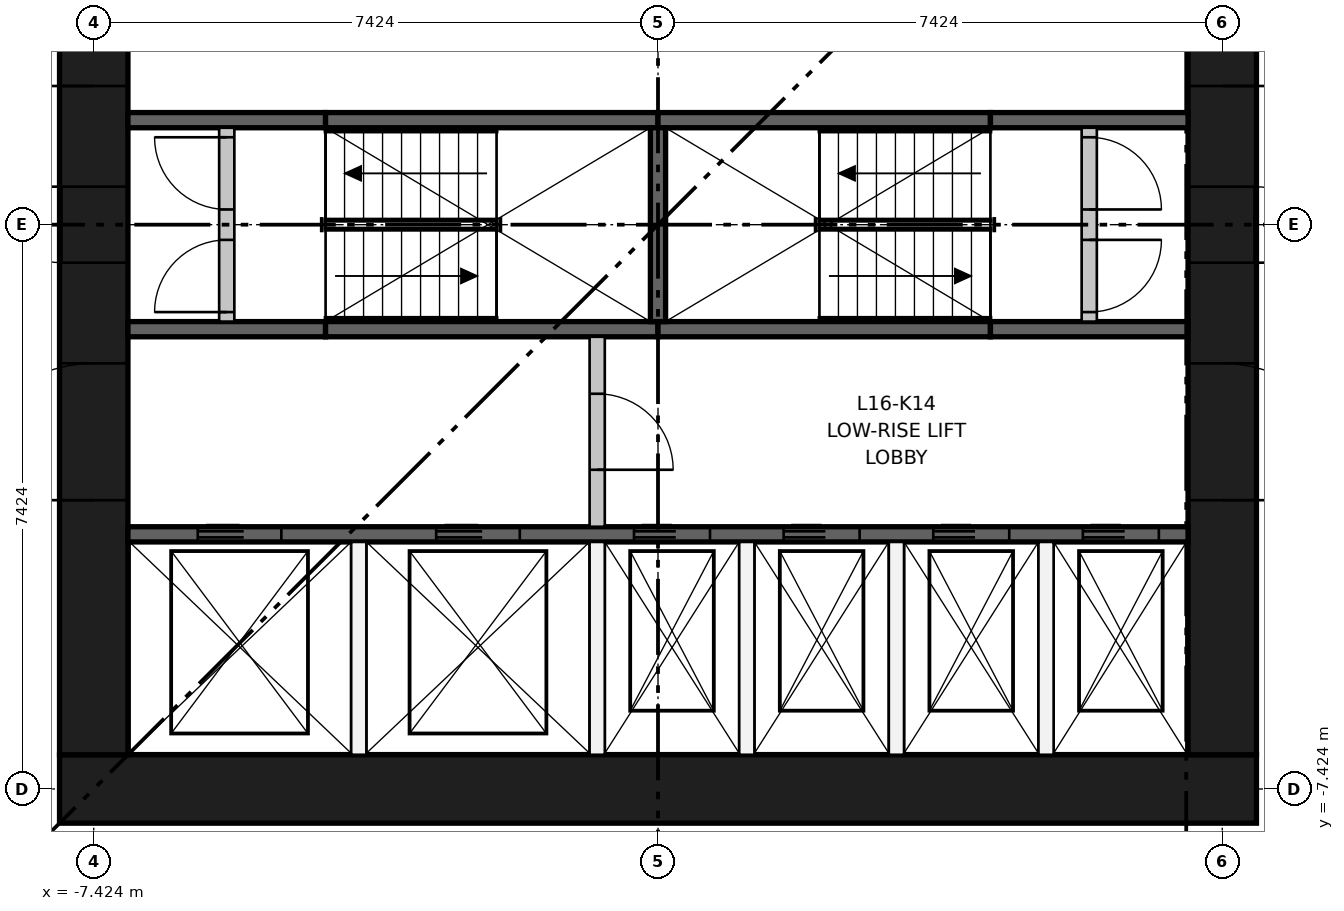
"""IFC4 building model, lengths in metres.
Left out: names, types, materials, properties, quantities, classifications, styles, units other than length and angle.
Written with IfcOpenShell. Run it as: python <this file> out.ifc"""

import sys

from ifc_helpers import new_model, si_unit, direction, frame, frame_2d, origin, place, context, subcontext, project, spatial, rectangle, extrude, element, fill, save


model = new_model("IFC4")
c1 = context("Model", 3, precision=1e-05, world=origin(), true_north=direction((0.0, 1.0)))
c2 = subcontext(c1, "Body", "Model", "MODEL_VIEW")
j1 = project(units=[si_unit("LENGTHUNIT", "METRE"), si_unit("PLANEANGLEUNIT", "RADIAN")], contexts=[c1])
p1 = place(None, origin())
s1 = spatial("IfcSite", under=j1, at=p1, CompositionType="ELEMENT")
p2 = place(p1, origin())
s2 = spatial("IfcBuilding", under=s1, at=p2, CompositionType="ELEMENT")
p3 = place(p2, frame((0.0, 0.0, 62.7)))
s3 = spatial("IfcBuildingStorey", under=s2, at=p3, CompositionType="ELEMENT", Elevation=62.7)
p4 = place(p3, frame((-7.874, -7.424, 0.0), z_axis=(0.0, 0.0, 1.0), x_axis=(1.0, 0.0, 0.0)))
e1 = element("IfcWall", 1, at=p4, inside=s3, PredefinedType="SHEAR", context=c2, shape_type="SweptSolid", body=[
    extrude(rectangle(XDim=15.748, YDim=0.9, at=frame_2d((7.874, 0.0))), origin(), (0.0, 0.0, 1.0), 3.65),
])
p5 = place(p3, frame((-7.424, -6.974, 0.0), z_axis=(0.0, 0.0, 1.0), x_axis=(0.0, 1.0, 0.0)))
e2 = element("IfcWall", 2, at=p5, inside=s3, PredefinedType="SHEAR", context=c2, shape_type="SweptSolid", body=[
    extrude(rectangle(XDim=13.948, YDim=0.9, at=frame_2d((6.974, 0.0))), origin(), (0.0, 0.0, 1.0), 3.65),
])
p6 = place(p5, frame((6.474, 0.0, 0.0)))
e3 = element("IfcOpeningElement", 3, at=p6, cuts=e2, PredefinedType="OPENING", context=c2, shape_type="SweptSolid", body=[
    extrude(rectangle(XDim=1.0, YDim=2.1, at=frame_2d((0.5, 1.05))), frame((0.0, 0.46, 0.0), z_axis=(0.0, -1.0, 0.0), x_axis=(1.0, 0.0, 0.0)), (0.0, 0.0, 1.0), 0.92),
])
p7 = place(p5, frame((3.35, 0.0, 0.0)))
e4 = element("IfcOpeningElement", 4, at=p7, cuts=e2, PredefinedType="OPENING", context=c2, shape_type="SweptSolid", body=[
    extrude(rectangle(XDim=1.8, YDim=2.1, at=frame_2d((0.9, 1.05))), frame((0.0, 0.46, 0.0), z_axis=(0.0, -1.0, 0.0), x_axis=(1.0, 0.0, 0.0)), (0.0, 0.0, 1.0), 0.92),
])
p8 = place(p5, frame((8.799, 0.0, 0.0)))
e5 = element("IfcOpeningElement", 5, at=p8, cuts=e2, PredefinedType="OPENING", context=c2, shape_type="SweptSolid", body=[
    extrude(rectangle(XDim=1.8, YDim=2.1, at=frame_2d((0.9, 1.05))), frame((0.0, 0.46, 0.0), z_axis=(0.0, -1.0, 0.0), x_axis=(1.0, 0.0, 0.0)), (0.0, 0.0, 1.0), 0.92),
])
p9 = place(p5, frame((11.974, 0.0, 0.0)))
e6 = element("IfcOpeningElement", 6, at=p9, cuts=e2, PredefinedType="OPENING", context=c2, shape_type="SweptSolid", body=[
    extrude(rectangle(XDim=1.0, YDim=2.1, at=frame_2d((0.5, 1.05))), frame((0.0, 0.46, 0.0), z_axis=(0.0, -1.0, 0.0), x_axis=(1.0, 0.0, 0.0)), (0.0, 0.0, 1.0), 0.92),
])
p10 = place(p3, frame((7.424, -6.974, 0.0), z_axis=(0.0, 0.0, 1.0), x_axis=(0.0, 1.0, 0.0)))
e7 = element("IfcWall", 7, at=p10, inside=s3, PredefinedType="SHEAR", context=c2, shape_type="SweptSolid", body=[
    extrude(rectangle(XDim=13.948, YDim=0.9, at=frame_2d((6.974, 0.0))), origin(), (0.0, 0.0, 1.0), 3.65),
])
p11 = place(p10, frame((6.474, 0.0, 0.0)))
e8 = element("IfcOpeningElement", 8, at=p11, cuts=e7, PredefinedType="OPENING", context=c2, shape_type="SweptSolid", body=[
    extrude(rectangle(XDim=1.0, YDim=2.1, at=frame_2d((0.5, 1.05))), frame((0.0, 0.46, 0.0), z_axis=(0.0, -1.0, 0.0), x_axis=(1.0, 0.0, 0.0)), (0.0, 0.0, 1.0), 0.92),
])
p12 = place(p10, frame((3.35, 0.0, 0.0)))
e9 = element("IfcOpeningElement", 9, at=p12, cuts=e7, PredefinedType="OPENING", context=c2, shape_type="SweptSolid", body=[
    extrude(rectangle(XDim=1.8, YDim=2.1, at=frame_2d((0.9, 1.05))), frame((0.0, 0.46, 0.0), z_axis=(0.0, -1.0, 0.0), x_axis=(1.0, 0.0, 0.0)), (0.0, 0.0, 1.0), 0.92),
])
p13 = place(p10, frame((8.799, 0.0, 0.0)))
e10 = element("IfcOpeningElement", 10, at=p13, cuts=e7, PredefinedType="OPENING", context=c2, shape_type="SweptSolid", body=[
    extrude(rectangle(XDim=1.8, YDim=2.1, at=frame_2d((0.9, 1.05))), frame((0.0, 0.46, 0.0), z_axis=(0.0, -1.0, 0.0), x_axis=(1.0, 0.0, 0.0)), (0.0, 0.0, 1.0), 0.92),
])
p14 = place(p3, frame((-6.974, -4.074, 0.0), z_axis=(0.0, 0.0, 1.0), x_axis=(1.0, 0.0, 0.0)))
e11 = element("IfcWall", 11, at=p14, inside=s3, PredefinedType="SHEAR", context=c2, shape_type="SweptSolid", body=[
    extrude(rectangle(XDim=13.948, YDim=0.2, at=frame_2d((6.974, 0.0))), origin(), (0.0, 0.0, 1.0), 3.3),
])
p15 = place(p14, frame((0.918, 0.0, 0.0)))
e12 = element("IfcOpeningElement", 12, at=p15, cuts=e11, PredefinedType="OPENING", context=c2, shape_type="SweptSolid", body=[
    extrude(rectangle(XDim=1.1, YDim=2.1, at=frame_2d((0.55, 1.05))), frame((0.0, 0.11, 0.0), z_axis=(0.0, -1.0, 0.0), x_axis=(1.0, 0.0, 0.0)), (0.0, 0.0, 1.0), 0.22),
])
p16 = place(p14, frame((4.055, 0.0, 0.0)))
e13 = element("IfcOpeningElement", 13, at=p16, cuts=e11, PredefinedType="OPENING", context=c2, shape_type="SweptSolid", body=[
    extrude(rectangle(XDim=1.1, YDim=2.1, at=frame_2d((0.55, 1.05))), frame((0.0, 0.11, 0.0), z_axis=(0.0, -1.0, 0.0), x_axis=(1.0, 0.0, 0.0)), (0.0, 0.0, 1.0), 0.22),
])
p17 = place(p14, frame((6.658, 0.0, 0.0)))
e14 = element("IfcOpeningElement", 14, at=p17, cuts=e11, PredefinedType="OPENING", context=c2, shape_type="SweptSolid", body=[
    extrude(rectangle(XDim=1.0, YDim=2.1, at=frame_2d((0.5, 1.05))), frame((0.0, 0.11, 0.0), z_axis=(0.0, -1.0, 0.0), x_axis=(1.0, 0.0, 0.0)), (0.0, 0.0, 1.0), 0.22),
])
p18 = place(p14, frame((8.627, 0.0, 0.0)))
e15 = element("IfcOpeningElement", 15, at=p18, cuts=e11, PredefinedType="OPENING", context=c2, shape_type="SweptSolid", body=[
    extrude(rectangle(XDim=1.0, YDim=2.1, at=frame_2d((0.5, 1.05))), frame((0.0, 0.11, 0.0), z_axis=(0.0, -1.0, 0.0), x_axis=(1.0, 0.0, 0.0)), (0.0, 0.0, 1.0), 0.22),
])
p19 = place(p14, frame((10.595, 0.0, 0.0)))
e16 = element("IfcOpeningElement", 16, at=p19, cuts=e11, PredefinedType="OPENING", context=c2, shape_type="SweptSolid", body=[
    extrude(rectangle(XDim=1.0, YDim=2.1, at=frame_2d((0.5, 1.05))), frame((0.0, 0.11, 0.0), z_axis=(0.0, -1.0, 0.0), x_axis=(1.0, 0.0, 0.0)), (0.0, 0.0, 1.0), 0.22),
])
p20 = place(p14, frame((12.564, 0.0, 0.0)))
e17 = element("IfcOpeningElement", 17, at=p20, cuts=e11, PredefinedType="OPENING", context=c2, shape_type="SweptSolid", body=[
    extrude(rectangle(XDim=1.0, YDim=2.1, at=frame_2d((0.5, 1.05))), frame((0.0, 0.11, 0.0), z_axis=(0.0, -1.0, 0.0), x_axis=(1.0, 0.0, 0.0)), (0.0, 0.0, 1.0), 0.22),
])
p21 = place(p3, frame((-6.974, -1.375, 0.0), z_axis=(0.0, 0.0, 1.0), x_axis=(1.0, 0.0, 0.0)))
e18 = element("IfcWall", 18, at=p21, inside=s3, PredefinedType="SHEAR", context=c2, shape_type="SweptSolid", body=[
    extrude(rectangle(XDim=2.6, YDim=0.2, at=frame_2d((1.3, 0.0))), origin(), (0.0, 0.0, 1.0), 3.3),
])
for number, where, z_axis, x_axis in (
    (19, (-4.374, -1.375, 0.0), (0.0, 0.0, 1.0), (1.0, 0.0, 0.0)),
    (20, (0.0, -1.375, 0.0), (0.0, 0.0, 1.0), (1.0, 0.0, 0.0)),
):
    element("IfcWall", number, at=place(p3, frame(where, z_axis=z_axis, x_axis=x_axis)), inside=s3, PredefinedType="SHEAR", context=c2, shape_type="SweptSolid", body=[
        extrude(rectangle(XDim=4.374, YDim=0.2, at=frame_2d((2.187, 0.0))), origin(), (0.0, 0.0, 1.0), 3.3),
    ])
for number, where, z_axis, x_axis in (
    (21, (4.374, -1.375, 0.0), (0.0, 0.0, 1.0), (1.0, 0.0, 0.0)),
    (22, (-6.974, 1.375, 0.0), (0.0, 0.0, 1.0), (1.0, 0.0, 0.0)),
):
    element("IfcWall", number, at=place(p3, frame(where, z_axis=z_axis, x_axis=x_axis)), inside=s3, PredefinedType="SHEAR", context=c2, shape_type="SweptSolid", body=[
        extrude(rectangle(XDim=2.6, YDim=0.2, at=frame_2d((1.3, 0.0))), origin(), (0.0, 0.0, 1.0), 3.3),
    ])
for number, where, z_axis, x_axis in (
    (23, (-4.374, 1.375, 0.0), (0.0, 0.0, 1.0), (1.0, 0.0, 0.0)),
    (24, (0.0, 1.375, 0.0), (0.0, 0.0, 1.0), (1.0, 0.0, 0.0)),
):
    element("IfcWall", number, at=place(p3, frame(where, z_axis=z_axis, x_axis=x_axis)), inside=s3, PredefinedType="SHEAR", context=c2, shape_type="SweptSolid", body=[
        extrude(rectangle(XDim=4.374, YDim=0.2, at=frame_2d((2.187, 0.0))), origin(), (0.0, 0.0, 1.0), 3.3),
    ])
p22 = place(p3, frame((4.374, 1.375, 0.0), z_axis=(0.0, 0.0, 1.0), x_axis=(1.0, 0.0, 0.0)))
e25 = element("IfcWall", 25, at=p22, inside=s3, PredefinedType="SHEAR", context=c2, shape_type="SweptSolid", body=[
    extrude(rectangle(XDim=2.6, YDim=0.2, at=frame_2d((1.3, 0.0))), origin(), (0.0, 0.0, 1.0), 3.3),
])
p23 = place(p3, frame((0.0, -1.275, 0.0), z_axis=(0.0, 0.0, 1.0), x_axis=(0.0, 1.0, 0.0)))
e26 = element("IfcWall", 26, at=p23, inside=s3, PredefinedType="SHEAR", context=c2, shape_type="SweptSolid", body=[
    extrude(rectangle(XDim=2.55, YDim=0.2, at=frame_2d((1.275, 0.0))), origin(), (0.0, 0.0, 1.0), 3.3),
])
for number, where, z_axis, x_axis in (
    (27, (-3.937, -6.974, 0.0), (0.0, 0.0, 1.0), (0.0, 1.0, 0.0)),
    (28, (-0.8, -6.974, 0.0), (0.0, 0.0, 1.0), (0.0, 1.0, 0.0)),
):
    element("IfcWall", number, at=place(p3, frame(where, z_axis=z_axis, x_axis=x_axis)), inside=s3, PredefinedType="PARTITIONING", context=c2, shape_type="SweptSolid", body=[
        extrude(rectangle(XDim=2.8, YDim=0.2, at=frame_2d((1.4, 0.0))), origin(), (0.0, 0.0, 1.0), 3.3),
    ])
p24 = place(p3, frame((-0.8, -3.974, 0.0), z_axis=(0.0, 0.0, 1.0), x_axis=(0.0, 1.0, 0.0)))
e29 = element("IfcWall", 29, at=p24, inside=s3, PredefinedType="PARTITIONING", context=c2, shape_type="SweptSolid", body=[
    extrude(rectangle(XDim=2.499, YDim=0.2, at=frame_2d((1.25, 0.0))), origin(), (0.0, 0.0, 1.0), 3.3),
])
p25 = place(p24, frame((0.75, 0.0, 0.0)))
e30 = element("IfcOpeningElement", 30, at=p25, cuts=e29, PredefinedType="OPENING", context=c2, shape_type="SweptSolid", body=[
    extrude(rectangle(XDim=1.0, YDim=2.1, at=frame_2d((0.5, 1.05))), frame((0.0, 0.11, 0.0), z_axis=(0.0, -1.0, 0.0), x_axis=(1.0, 0.0, 0.0)), (0.0, 0.0, 1.0), 0.22),
])
for number, where, z_axis, x_axis in (
    (31, (1.168, -6.974, 0.0), (0.0, 0.0, 1.0), (0.0, 1.0, 0.0)),
    (32, (3.137, -6.974, 0.0), (0.0, 0.0, 1.0), (0.0, 1.0, 0.0)),
    (33, (5.105, -6.974, 0.0), (0.0, 0.0, 1.0), (0.0, 1.0, 0.0)),
):
    element("IfcWall", number, at=place(p3, frame(where, z_axis=z_axis, x_axis=x_axis)), inside=s3, PredefinedType="PARTITIONING", context=c2, shape_type="SweptSolid", body=[
        extrude(rectangle(XDim=2.8, YDim=0.2, at=frame_2d((1.4, 0.0))), origin(), (0.0, 0.0, 1.0), 3.3),
    ])
p26 = place(p3, frame((-5.674, -1.275, 0.0), z_axis=(0.0, 0.0, 1.0), x_axis=(0.0, 1.0, 0.0)))
e34 = element("IfcWall", 34, at=p26, inside=s3, PredefinedType="PARTITIONING", context=c2, shape_type="SweptSolid", body=[
    extrude(rectangle(XDim=2.55, YDim=0.2, at=frame_2d((1.275, 0.0))), origin(), (0.0, 0.0, 1.0), 3.3),
])
p27 = place(p26, frame((0.125, 0.0, 0.0)))
e35 = element("IfcOpeningElement", 35, at=p27, cuts=e34, PredefinedType="OPENING", context=c2, shape_type="SweptSolid", body=[
    extrude(rectangle(XDim=0.95, YDim=2.1, at=frame_2d((0.475, 1.05))), frame((0.0, 0.11, 0.0), z_axis=(0.0, -1.0, 0.0), x_axis=(1.0, 0.0, 0.0)), (0.0, 0.0, 1.0), 0.22),
])
p28 = place(p26, frame((1.475, 0.0, 0.0)))
e36 = element("IfcOpeningElement", 36, at=p28, cuts=e34, PredefinedType="OPENING", context=c2, shape_type="SweptSolid", body=[
    extrude(rectangle(XDim=0.95, YDim=2.1, at=frame_2d((0.475, 1.05))), frame((0.0, 0.11, 0.0), z_axis=(0.0, -1.0, 0.0), x_axis=(1.0, 0.0, 0.0)), (0.0, 0.0, 1.0), 0.22),
])
p29 = place(p3, frame((5.674, -1.275, 0.0), z_axis=(0.0, 0.0, 1.0), x_axis=(0.0, 1.0, 0.0)))
e37 = element("IfcWall", 37, at=p29, inside=s3, PredefinedType="PARTITIONING", context=c2, shape_type="SweptSolid", body=[
    extrude(rectangle(XDim=2.55, YDim=0.2, at=frame_2d((1.275, 0.0))), origin(), (0.0, 0.0, 1.0), 3.3),
])
p30 = place(p29, frame((0.125, 0.0, 0.0)))
e38 = element("IfcOpeningElement", 38, at=p30, cuts=e37, PredefinedType="OPENING", context=c2, shape_type="SweptSolid", body=[
    extrude(rectangle(XDim=0.95, YDim=2.1, at=frame_2d((0.475, 1.05))), frame((0.0, 0.11, 0.0), z_axis=(0.0, -1.0, 0.0), x_axis=(1.0, 0.0, 0.0)), (0.0, 0.0, 1.0), 0.22),
])
p31 = place(p29, frame((1.475, 0.0, 0.0)))
e39 = element("IfcOpeningElement", 39, at=p31, cuts=e37, PredefinedType="OPENING", context=c2, shape_type="SweptSolid", body=[
    extrude(rectangle(XDim=0.95, YDim=2.1, at=frame_2d((0.475, 1.05))), frame((0.0, 0.11, 0.0), z_axis=(0.0, -1.0, 0.0), x_axis=(1.0, 0.0, 0.0)), (0.0, 0.0, 1.0), 0.22),
])
p32 = place(p15, origin())
e40 = element("IfcDoor", 40, at=p32, inside=s3, OperationType="DOUBLE_DOOR_SLIDING", PredefinedType="DOOR", context=c2, shape_type="SweptSolid", body=[
    extrude(rectangle(XDim=1.1, YDim=2.1, at=frame_2d((0.55, 1.05))), frame((0.0, 0.025, 0.0), z_axis=(0.0, -1.0, 0.0), x_axis=(1.0, 0.0, 0.0)), (0.0, 0.0, 1.0), 0.05),
])
fill(e12, e40)
p33 = place(p16, origin())
e41 = element("IfcDoor", 41, at=p33, inside=s3, OperationType="DOUBLE_DOOR_SLIDING", PredefinedType="DOOR", context=c2, shape_type="SweptSolid", body=[
    extrude(rectangle(XDim=1.1, YDim=2.1, at=frame_2d((0.55, 1.05))), frame((0.0, 0.025, 0.0), z_axis=(0.0, -1.0, 0.0), x_axis=(1.0, 0.0, 0.0)), (0.0, 0.0, 1.0), 0.05),
])
fill(e13, e41)
p34 = place(p17, origin())
e42 = element("IfcDoor", 42, at=p34, inside=s3, OperationType="DOUBLE_DOOR_SLIDING", PredefinedType="DOOR", context=c2, shape_type="SweptSolid", body=[
    extrude(rectangle(XDim=1.0, YDim=2.1, at=frame_2d((0.5, 1.05))), frame((0.0, 0.025, 0.0), z_axis=(0.0, -1.0, 0.0), x_axis=(1.0, 0.0, 0.0)), (0.0, 0.0, 1.0), 0.05),
])
fill(e14, e42)
p35 = place(p18, origin())
e43 = element("IfcDoor", 43, at=p35, inside=s3, OperationType="DOUBLE_DOOR_SLIDING", PredefinedType="DOOR", context=c2, shape_type="SweptSolid", body=[
    extrude(rectangle(XDim=1.0, YDim=2.1, at=frame_2d((0.5, 1.05))), frame((0.0, 0.025, 0.0), z_axis=(0.0, -1.0, 0.0), x_axis=(1.0, 0.0, 0.0)), (0.0, 0.0, 1.0), 0.05),
])
fill(e15, e43)
p36 = place(p19, origin())
e44 = element("IfcDoor", 44, at=p36, inside=s3, OperationType="DOUBLE_DOOR_SLIDING", PredefinedType="DOOR", context=c2, shape_type="SweptSolid", body=[
    extrude(rectangle(XDim=1.0, YDim=2.1, at=frame_2d((0.5, 1.05))), frame((0.0, 0.025, 0.0), z_axis=(0.0, -1.0, 0.0), x_axis=(1.0, 0.0, 0.0)), (0.0, 0.0, 1.0), 0.05),
])
fill(e16, e44)
p37 = place(p20, origin())
e45 = element("IfcDoor", 45, at=p37, inside=s3, OperationType="DOUBLE_DOOR_SLIDING", PredefinedType="DOOR", context=c2, shape_type="SweptSolid", body=[
    extrude(rectangle(XDim=1.0, YDim=2.1, at=frame_2d((0.5, 1.05))), frame((0.0, 0.025, 0.0), z_axis=(0.0, -1.0, 0.0), x_axis=(1.0, 0.0, 0.0)), (0.0, 0.0, 1.0), 0.05),
])
fill(e17, e45)
p38 = place(p27, origin())
e46 = element("IfcDoor", 46, at=p38, inside=s3, OperationType="SINGLE_SWING_LEFT", PredefinedType="DOOR", context=c2, shape_type="SweptSolid", body=[
    extrude(rectangle(XDim=0.95, YDim=2.1, at=frame_2d((0.475, 1.05))), frame((0.0, 0.025, 0.0), z_axis=(0.0, -1.0, 0.0), x_axis=(1.0, 0.0, 0.0)), (0.0, 0.0, 1.0), 0.05),
])
fill(e35, e46)
p39 = place(p28, origin())
e47 = element("IfcDoor", 47, at=p39, inside=s3, OperationType="SINGLE_SWING_RIGHT", PredefinedType="DOOR", context=c2, shape_type="SweptSolid", body=[
    extrude(rectangle(XDim=0.95, YDim=2.1, at=frame_2d((0.475, 1.05))), frame((0.0, 0.025, 0.0), z_axis=(0.0, -1.0, 0.0), x_axis=(1.0, 0.0, 0.0)), (0.0, 0.0, 1.0), 0.05),
])
fill(e36, e47)
p40 = place(p30, frame((0.95, 0.0, 0.0), z_axis=(0.0, 0.0, 1.0), x_axis=(-1.0, 0.0, 0.0)))
e48 = element("IfcDoor", 48, at=p40, inside=s3, OperationType="SINGLE_SWING_RIGHT", PredefinedType="DOOR", context=c2, shape_type="SweptSolid", body=[
    extrude(rectangle(XDim=0.95, YDim=2.1, at=frame_2d((0.475, 1.05))), frame((0.0, 0.025, 0.0), z_axis=(0.0, -1.0, 0.0), x_axis=(1.0, 0.0, 0.0)), (0.0, 0.0, 1.0), 0.05),
])
fill(e38, e48)
p41 = place(p31, frame((0.95, 0.0, 0.0), z_axis=(0.0, 0.0, 1.0), x_axis=(-1.0, 0.0, 0.0)))
e49 = element("IfcDoor", 49, at=p41, inside=s3, OperationType="SINGLE_SWING_LEFT", PredefinedType="DOOR", context=c2, shape_type="SweptSolid", body=[
    extrude(rectangle(XDim=0.95, YDim=2.1, at=frame_2d((0.475, 1.05))), frame((0.0, 0.025, 0.0), z_axis=(0.0, -1.0, 0.0), x_axis=(1.0, 0.0, 0.0)), (0.0, 0.0, 1.0), 0.05),
])
fill(e39, e49)
p42 = place(p25, frame((1.0, 0.0, 0.0), z_axis=(0.0, 0.0, 1.0), x_axis=(-1.0, 0.0, 0.0)))
e50 = element("IfcDoor", 50, at=p42, inside=s3, OperationType="SINGLE_SWING_LEFT", PredefinedType="DOOR", context=c2, shape_type="SweptSolid", body=[
    extrude(rectangle(XDim=1.0, YDim=2.1, at=frame_2d((0.5, 1.05))), frame((0.0, 0.025, 0.0), z_axis=(0.0, -1.0, 0.0), x_axis=(1.0, 0.0, 0.0)), (0.0, 0.0, 1.0), 0.05),
])
fill(e30, e50)
p43 = place(p6, origin())
e51 = element("IfcDoor", 51, at=p43, inside=s3, OperationType="SINGLE_SWING_RIGHT", PredefinedType="DOOR", context=c2, shape_type="SweptSolid", body=[
    extrude(rectangle(XDim=1.0, YDim=2.1, at=frame_2d((0.5, 1.05))), frame((0.0, 0.45, 0.0), z_axis=(0.0, -1.0, 0.0), x_axis=(1.0, 0.0, 0.0)), (0.0, 0.0, 1.0), 0.05),
])
fill(e3, e51)
p44 = place(p7, origin())
e52 = element("IfcDoor", 52, at=p44, inside=s3, OperationType="DOUBLE_DOOR_SINGLE_SWING", PredefinedType="DOOR", context=c2, shape_type="SweptSolid", body=[
    extrude(rectangle(XDim=1.8, YDim=2.1, at=frame_2d((0.9, 1.05))), frame((0.0, 0.025, 0.0), z_axis=(0.0, -1.0, 0.0), x_axis=(1.0, 0.0, 0.0)), (0.0, 0.0, 1.0), 0.05),
])
fill(e4, e52)
p45 = place(p8, origin())
e53 = element("IfcDoor", 53, at=p45, inside=s3, OperationType="DOUBLE_DOOR_SINGLE_SWING", PredefinedType="DOOR", context=c2, shape_type="SweptSolid", body=[
    extrude(rectangle(XDim=1.8, YDim=2.1, at=frame_2d((0.9, 1.05))), frame((0.0, 0.025, 0.0), z_axis=(0.0, -1.0, 0.0), x_axis=(1.0, 0.0, 0.0)), (0.0, 0.0, 1.0), 0.05),
])
fill(e5, e53)
p46 = place(p11, frame((1.0, 0.0, 0.0), z_axis=(0.0, 0.0, 1.0), x_axis=(-1.0, 0.0, 0.0)))
e54 = element("IfcDoor", 54, at=p46, inside=s3, OperationType="SINGLE_SWING_LEFT", PredefinedType="DOOR", context=c2, shape_type="SweptSolid", body=[
    extrude(rectangle(XDim=1.0, YDim=2.1, at=frame_2d((0.5, 1.05))), frame((0.0, 0.45, 0.0), z_axis=(0.0, -1.0, 0.0), x_axis=(1.0, 0.0, 0.0)), (0.0, 0.0, 1.0), 0.05),
])
fill(e8, e54)
p47 = place(p12, frame((1.8, 0.0, 0.0), z_axis=(0.0, 0.0, 1.0), x_axis=(-1.0, 0.0, 0.0)))
e55 = element("IfcDoor", 55, at=p47, inside=s3, OperationType="DOUBLE_DOOR_SINGLE_SWING", PredefinedType="DOOR", context=c2, shape_type="SweptSolid", body=[
    extrude(rectangle(XDim=1.8, YDim=2.1, at=frame_2d((0.9, 1.05))), frame((0.0, 0.025, 0.0), z_axis=(0.0, -1.0, 0.0), x_axis=(1.0, 0.0, 0.0)), (0.0, 0.0, 1.0), 0.05),
])
fill(e9, e55)
p48 = place(p13, frame((1.8, 0.0, 0.0), z_axis=(0.0, 0.0, 1.0), x_axis=(-1.0, 0.0, 0.0)))
e56 = element("IfcDoor", 56, at=p48, inside=s3, OperationType="DOUBLE_DOOR_SINGLE_SWING", PredefinedType="DOOR", context=c2, shape_type="SweptSolid", body=[
    extrude(rectangle(XDim=1.8, YDim=2.1, at=frame_2d((0.9, 1.05))), frame((0.0, 0.025, 0.0), z_axis=(0.0, -1.0, 0.0), x_axis=(1.0, 0.0, 0.0)), (0.0, 0.0, 1.0), 0.05),
])
fill(e10, e56)
save(model, sys.argv[1])
